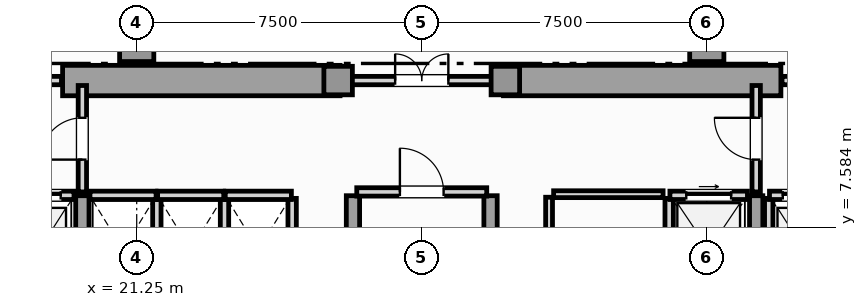
"""IFC4 building model, lengths in metres.
Left out: names, types, materials, properties, quantities, classifications, styles, units other than length and angle.
Written with IfcOpenShell. Run it as: python <this file> out.ifc"""

import sys

from ifc_helpers import new_model, si_unit, direction, frame, frame_2d, origin, origin_2d, place, context, subcontext, project, spatial, rectangle, extrude, element, fill, save


model = new_model("IFC4")
c1 = context("Model", 3, precision=1e-05, world=origin(), true_north=direction((0.0, 1.0)))
c2 = subcontext(c1, "Body", "Model", "MODEL_VIEW")
j1 = project(units=[si_unit("LENGTHUNIT", "METRE"), si_unit("PLANEANGLEUNIT", "RADIAN")], contexts=[c1])
p1 = place(None, origin())
s1 = spatial("IfcSite", under=j1, at=p1, CompositionType="ELEMENT")
p2 = place(p1, origin())
s2 = spatial("IfcBuilding", under=s1, at=p2, CompositionType="ELEMENT")
p3 = place(p2, frame((0.0, 0.0, 19.8)))
s3 = spatial("IfcBuildingStorey", under=s2, at=p3, CompositionType="ELEMENT", Elevation=19.8)
for number, where, z_axis, x_axis in (
    (1, (19.3, 11.45, 0.0), (0.0, 0.0, 1.0), (1.0, 0.0, 0.0)),
    (2, (30.9, 11.45, 0.0), (0.0, 0.0, 1.0), (1.0, 0.0, 0.0)),
):
    element("IfcWall", number, at=place(p3, frame(where, z_axis=z_axis, x_axis=x_axis)), inside=s3, PredefinedType="SHEAR", context=c2, shape_type="SweptSolid", body=[
        extrude(rectangle(XDim=7.3, YDim=0.8, at=frame_2d((3.65, 0.0))), origin(), (0.0, 0.0, 1.0), 4.4),
    ])
for number, where, z_axis, x_axis in (
    (3, (19.82, 0.92, 0.0), (0.0, 0.0, 1.0), (0.0, 1.0, 0.0)),
    (4, (26.94, 0.92, 0.0), (0.0, 0.0, 1.0), (0.0, 1.0, 0.0)),
    (5, (30.56, 0.92, 0.0), (0.0, 0.0, 1.0), (0.0, 1.0, 0.0)),
    (6, (37.55, 0.92, 0.0), (0.0, 0.0, 1.0), (0.0, 1.0, 0.0)),
):
    element("IfcWall", number, at=place(p3, frame(where, z_axis=z_axis, x_axis=x_axis)), inside=s3, PredefinedType="SHEAR", context=c2, shape_type="SweptSolid", body=[
        extrude(rectangle(XDim=7.5, YDim=0.35, at=frame_2d((3.75, 0.0))), origin(), (0.0, 0.0, 1.0), 4.4),
    ])
for number, where, z_axis, x_axis in (
    (7, (26.55, 11.45, 0.0), (0.0, 0.0, 1.0), (1.0, 0.0, 0.0)),
    (8, (30.95, 11.45, 0.0), (0.0, 0.0, 1.0), (1.0, 0.0, 0.0)),
):
    element("IfcColumn", number, at=place(p3, frame(where, z_axis=z_axis, x_axis=x_axis)), inside=s3, PredefinedType="COLUMN", context=c2, shape_type="SweptSolid", body=[
        extrude(rectangle(XDim=0.75, YDim=0.75, at=origin_2d()), origin(), (0.0, 0.0, 1.0), 4.8),
    ])
for number, where, z_axis, x_axis in (
    (9, (21.25, 12.4, 0.0), (0.0, 0.0, 1.0), (1.0, 0.0, 0.0)),
    (10, (36.25, 12.4, 0.0), (0.0, 0.0, 1.0), (1.0, 0.0, 0.0)),
):
    element("IfcColumn", number, at=place(p3, frame(where, z_axis=z_axis, x_axis=x_axis)), inside=s3, PredefinedType="COLUMN", context=c2, shape_type="SweptSolid", body=[
        extrude(rectangle(XDim=0.9, YDim=0.9, at=origin_2d()), origin(), (0.0, 0.0, 1.0), 4.8),
    ])
p4 = place(p3, frame((17.78, 8.43, 0.0), z_axis=(0.0, 0.0, 1.0), x_axis=(1.0, 0.0, 0.0)))
e11 = element("IfcWall", 11, at=p4, inside=s3, PredefinedType="SOLIDWALL", context=c2, shape_type="SweptSolid", body=[
    extrude(rectangle(XDim=1.82, YDim=0.22, at=frame_2d((0.91, 0.0))), origin(), (0.0, 0.0, 1.0), 4.4),
])
p5 = place(p4, frame((0.35, 0.0, 0.0)))
e12 = element("IfcOpeningElement", 12, at=p5, cuts=e11, PredefinedType="OPENING", context=c2, shape_type="SweptSolid", body=[
    extrude(rectangle(XDim=1.12, YDim=2.25, at=frame_2d((0.56, 1.125))), frame((0.0, 0.12, 0.0), z_axis=(0.0, -1.0, 0.0), x_axis=(1.0, 0.0, 0.0)), (0.0, 0.0, 1.0), 0.24),
])
p6 = place(p3, frame((37.88, 5.65, 0.0), z_axis=(0.0, 0.0, 1.0), x_axis=(0.0, 1.0, 0.0)))
e13 = element("IfcWall", 13, at=p6, inside=s3, PredefinedType="SOLIDWALL", context=c2, shape_type="SweptSolid", body=[
    extrude(rectangle(XDim=2.7, YDim=0.22, at=frame_2d((1.35, 0.0))), origin(), (0.0, 0.0, 1.0), 4.4),
])
p7 = place(p3, frame((37.9, 8.43, 0.0), z_axis=(0.0, 0.0, 1.0), x_axis=(1.0, 0.0, 0.0)))
e14 = element("IfcWall", 14, at=p7, inside=s3, PredefinedType="SOLIDWALL", context=c2, shape_type="SweptSolid", body=[
    extrude(rectangle(XDim=1.82, YDim=0.22, at=frame_2d((0.91, 0.0))), origin(), (0.0, 0.0, 1.0), 4.4),
])
p8 = place(p7, frame((0.35, 0.0, 0.0)))
e15 = element("IfcOpeningElement", 15, at=p8, cuts=e14, PredefinedType="OPENING", context=c2, shape_type="SweptSolid", body=[
    extrude(rectangle(XDim=1.12, YDim=2.25, at=frame_2d((0.56, 1.125))), frame((0.0, 0.12, 0.0), z_axis=(0.0, -1.0, 0.0), x_axis=(1.0, 0.0, 0.0)), (0.0, 0.0, 1.0), 0.24),
])
p9 = place(p3, frame((35.26, 5.65, 0.0), z_axis=(0.0, 0.0, 1.0), x_axis=(0.0, 1.0, 0.0)))
e16 = element("IfcWall", 16, at=p9, inside=s3, PredefinedType="SOLIDWALL", context=c2, shape_type="SweptSolid", body=[
    extrude(rectangle(XDim=2.7, YDim=0.22, at=frame_2d((1.35, 0.0))), origin(), (0.0, 0.0, 1.0), 4.4),
])
p10 = place(p3, frame((35.28, 8.43, 0.0), z_axis=(0.0, 0.0, 1.0), x_axis=(1.0, 0.0, 0.0)))
e17 = element("IfcWall", 17, at=p10, inside=s3, PredefinedType="SOLIDWALL", context=c2, shape_type="SweptSolid", body=[
    extrude(rectangle(XDim=2.04, YDim=0.22, at=frame_2d((1.02, 0.0))), origin(), (0.0, 0.0, 1.0), 4.4),
])
p11 = place(p10, frame((0.43, 0.0, 0.0)))
e18 = element("IfcOpeningElement", 18, at=p11, cuts=e17, PredefinedType="OPENING", context=c2, shape_type="SweptSolid", body=[
    extrude(rectangle(XDim=1.18, YDim=2.2, at=frame_2d((0.59, 1.1))), frame((0.0, 0.12, 0.0), z_axis=(0.0, -1.0, 0.0), x_axis=(1.0, 0.0, 0.0)), (0.0, 0.0, 1.0), 0.24),
])
p12 = place(p3, frame((21.78, 5.65, 0.0), z_axis=(0.0, 0.0, 1.0), x_axis=(0.0, 1.0, 0.0)))
e19 = element("IfcWall", 19, at=p12, inside=s3, PredefinedType="SOLIDWALL", context=c2, shape_type="SweptSolid", body=[
    extrude(rectangle(XDim=2.7, YDim=0.22, at=frame_2d((1.35, 0.0))), origin(), (0.0, 0.0, 1.0), 4.4),
])
p13 = place(p3, frame((20.02, 8.43, 0.0), z_axis=(0.0, 0.0, 1.0), x_axis=(1.0, 0.0, 0.0)))
e20 = element("IfcWall", 20, at=p13, inside=s3, PredefinedType="SOLIDWALL", context=c2, shape_type="SweptSolid", body=[
    extrude(rectangle(XDim=1.74, YDim=0.22, at=frame_2d((0.87, 0.0))), origin(), (0.0, 0.0, 1.0), 4.4),
])
p14 = place(p3, frame((23.56, 5.65, 0.0), z_axis=(0.0, 0.0, 1.0), x_axis=(0.0, 1.0, 0.0)))
e21 = element("IfcWall", 21, at=p14, inside=s3, PredefinedType="SOLIDWALL", context=c2, shape_type="SweptSolid", body=[
    extrude(rectangle(XDim=2.7, YDim=0.22, at=frame_2d((1.35, 0.0))), origin(), (0.0, 0.0, 1.0), 4.4),
])
p15 = place(p3, frame((21.8, 8.43, 0.0), z_axis=(0.0, 0.0, 1.0), x_axis=(1.0, 0.0, 0.0)))
e22 = element("IfcWall", 22, at=p15, inside=s3, PredefinedType="SOLIDWALL", context=c2, shape_type="SweptSolid", body=[
    extrude(rectangle(XDim=1.74, YDim=0.22, at=frame_2d((0.87, 0.0))), origin(), (0.0, 0.0, 1.0), 4.4),
])
p16 = place(p3, frame((25.34, 5.65, 0.0), z_axis=(0.0, 0.0, 1.0), x_axis=(0.0, 1.0, 0.0)))
e23 = element("IfcWall", 23, at=p16, inside=s3, PredefinedType="SOLIDWALL", context=c2, shape_type="SweptSolid", body=[
    extrude(rectangle(XDim=2.7, YDim=0.22, at=frame_2d((1.35, 0.0))), origin(), (0.0, 0.0, 1.0), 4.4),
])
p17 = place(p3, frame((23.58, 8.43, 0.0), z_axis=(0.0, 0.0, 1.0), x_axis=(1.0, 0.0, 0.0)))
e24 = element("IfcWall", 24, at=p17, inside=s3, PredefinedType="SOLIDWALL", context=c2, shape_type="SweptSolid", body=[
    extrude(rectangle(XDim=1.74, YDim=0.22, at=frame_2d((0.87, 0.0))), origin(), (0.0, 0.0, 1.0), 4.4),
])
p18 = place(p3, frame((27.04, 8.52, 0.0), z_axis=(0.0, 0.0, 1.0), x_axis=(1.0, 0.0, 0.0)))
e25 = element("IfcWall", 25, at=p18, inside=s3, PredefinedType="SOLIDWALL", context=c2, shape_type="SweptSolid", body=[
    extrude(rectangle(XDim=3.42, YDim=0.22, at=frame_2d((1.71, 0.0))), origin(), (0.0, 0.0, 1.0), 4.4),
])
p19 = place(p18, frame((1.135, 0.0, 0.0)))
e26 = element("IfcOpeningElement", 26, at=p19, cuts=e25, PredefinedType="OPENING", context=c2, shape_type="SweptSolid", body=[
    extrude(rectangle(XDim=1.15, YDim=2.2, at=frame_2d((0.575, 1.1))), frame((0.0, 0.12, 0.0), z_axis=(0.0, -1.0, 0.0), x_axis=(1.0, 0.0, 0.0)), (0.0, 0.0, 1.0), 0.24),
])
p20 = place(p3, frame((19.82, 8.52, 0.0), z_axis=(0.0, 0.0, 1.0), x_axis=(0.0, 1.0, 0.0)))
e27 = element("IfcWall", 27, at=p20, inside=s3, PredefinedType="SOLIDWALL", context=c2, shape_type="SweptSolid", body=[
    extrude(rectangle(XDim=2.8, YDim=0.22, at=frame_2d((1.4, 0.0))), origin(), (0.0, 0.0, 1.0), 3.855),
])
p21 = place(p20, frame((0.85, 0.0, 0.0)))
e28 = element("IfcOpeningElement", 28, at=p21, cuts=e27, PredefinedType="OPENING", context=c2, shape_type="SweptSolid", body=[
    extrude(rectangle(XDim=1.1, YDim=2.2, at=frame_2d((0.55, 1.1))), frame((0.0, 0.12, 0.0), z_axis=(0.0, -1.0, 0.0), x_axis=(1.0, 0.0, 0.0)), (0.0, 0.0, 1.0), 0.24),
])
p22 = place(p3, frame((37.55, 8.52, 0.0), z_axis=(0.0, 0.0, 1.0), x_axis=(0.0, 1.0, 0.0)))
e29 = element("IfcWall", 29, at=p22, inside=s3, PredefinedType="SOLIDWALL", context=c2, shape_type="SweptSolid", body=[
    extrude(rectangle(XDim=2.8, YDim=0.22, at=frame_2d((1.4, 0.0))), origin(), (0.0, 0.0, 1.0), 3.855),
])
p23 = place(p22, frame((0.85, 0.0, 0.0)))
e30 = element("IfcOpeningElement", 30, at=p23, cuts=e29, PredefinedType="OPENING", context=c2, shape_type="SweptSolid", body=[
    extrude(rectangle(XDim=1.1, YDim=2.2, at=frame_2d((0.55, 1.1))), frame((0.0, 0.12, 0.0), z_axis=(0.0, -1.0, 0.0), x_axis=(1.0, 0.0, 0.0)), (0.0, 0.0, 1.0), 0.24),
])
p24 = place(p3, frame((16.23, 11.45, 0.0), z_axis=(0.0, 0.0, 1.0), x_axis=(1.0, 0.0, 0.0)))
e31 = element("IfcWall", 31, at=p24, inside=s3, PredefinedType="SOLIDWALL", context=c2, shape_type="SweptSolid", body=[
    extrude(rectangle(XDim=3.04, YDim=0.22, at=frame_2d((1.52, 0.0))), origin(), (0.0, 0.0, 1.0), 4.4),
])
p25 = place(p24, frame((0.97, 0.0, 0.0)))
e32 = element("IfcOpeningElement", 32, at=p25, cuts=e31, PredefinedType="OPENING", context=c2, shape_type="SweptSolid", body=[
    extrude(rectangle(XDim=1.1, YDim=2.2, at=frame_2d((0.55, 1.1))), frame((0.0, 0.12, 0.0), z_axis=(0.0, -1.0, 0.0), x_axis=(1.0, 0.0, 0.0)), (0.0, 0.0, 1.0), 0.24),
])
p26 = place(p3, frame((26.63, 11.45, 0.0), z_axis=(0.0, 0.0, 1.0), x_axis=(1.0, 0.0, 0.0)))
e33 = element("IfcWall", 33, at=p26, inside=s3, PredefinedType="SOLIDWALL", context=c2, shape_type="SweptSolid", body=[
    extrude(rectangle(XDim=4.24, YDim=0.22, at=frame_2d((2.12, 0.0))), origin(), (0.0, 0.0, 1.0), 4.4),
])
p27 = place(p26, frame((1.42, 0.0, 0.0)))
e34 = element("IfcOpeningElement", 34, at=p27, cuts=e33, PredefinedType="OPENING", context=c2, shape_type="SweptSolid", body=[
    extrude(rectangle(XDim=1.4, YDim=2.2, at=frame_2d((0.7, 1.1))), frame((0.0, 0.12, 0.0), z_axis=(0.0, -1.0, 0.0), x_axis=(1.0, 0.0, 0.0)), (0.0, 0.0, 1.0), 0.24),
])
p28 = place(p3, frame((38.23, 11.45, 0.0), z_axis=(0.0, 0.0, 1.0), x_axis=(1.0, 0.0, 0.0)))
e35 = element("IfcWall", 35, at=p28, inside=s3, PredefinedType="SOLIDWALL", context=c2, shape_type="SweptSolid", body=[
    extrude(rectangle(XDim=3.04, YDim=0.22, at=frame_2d((1.52, 0.0))), origin(), (0.0, 0.0, 1.0), 4.4),
])
p29 = place(p28, frame((0.97, 0.0, 0.0)))
e36 = element("IfcOpeningElement", 36, at=p29, cuts=e35, PredefinedType="OPENING", context=c2, shape_type="SweptSolid", body=[
    extrude(rectangle(XDim=1.1, YDim=2.2, at=frame_2d((0.55, 1.1))), frame((0.0, 0.12, 0.0), z_axis=(0.0, -1.0, 0.0), x_axis=(1.0, 0.0, 0.0)), (0.0, 0.0, 1.0), 0.24),
])
p30 = place(p3, frame((32.1, 5.65, 0.0), z_axis=(0.0, 0.0, 1.0), x_axis=(0.0, 1.0, 0.0)))
e37 = element("IfcWall", 37, at=p30, inside=s3, PredefinedType="PARTITIONING", context=c2, shape_type="SweptSolid", body=[
    extrude(rectangle(XDim=2.73, YDim=0.18, at=frame_2d((1.365, 0.0))), origin(), (0.0, 0.0, 1.0), 4.4),
])
p31 = place(p30, frame((0.925, 0.0, 0.0)))
e38 = element("IfcOpeningElement", 38, at=p31, cuts=e37, PredefinedType="OPENING", context=c2, shape_type="SweptSolid", body=[
    extrude(rectangle(XDim=0.88, YDim=2.05, at=frame_2d((0.44, 1.025))), frame((0.0, 0.1, 0.0), z_axis=(0.0, -1.0, 0.0), x_axis=(1.0, 0.0, 0.0)), (0.0, 0.0, 1.0), 0.2),
])
p32 = place(p3, frame((32.22, 8.46, 0.0), z_axis=(0.0, 0.0, 1.0), x_axis=(1.0, 0.0, 0.0)))
e39 = element("IfcWall", 39, at=p32, inside=s3, PredefinedType="PARTITIONING", context=c2, shape_type="SweptSolid", body=[
    extrude(rectangle(XDim=2.88, YDim=0.18, at=frame_2d((1.44, 0.0))), origin(), (0.0, 0.0, 1.0), 4.4),
])
p33 = place(p5, origin())
e40 = element("IfcDoor", 40, at=p33, inside=s3, OperationType="SLIDING_TO_RIGHT", PredefinedType="DOOR", context=c2, shape_type="SweptSolid", body=[
    extrude(rectangle(XDim=1.12, YDim=2.25, at=frame_2d((0.56, 1.125))), frame((0.0, 0.025, 0.0), z_axis=(0.0, -1.0, 0.0), x_axis=(1.0, 0.0, 0.0)), (0.0, 0.0, 1.0), 0.05),
])
fill(e12, e40)
p34 = place(p8, origin())
e41 = element("IfcDoor", 41, at=p34, inside=s3, OperationType="SLIDING_TO_LEFT", PredefinedType="DOOR", context=c2, shape_type="SweptSolid", body=[
    extrude(rectangle(XDim=1.12, YDim=2.25, at=frame_2d((0.56, 1.125))), frame((0.0, 0.025, 0.0), z_axis=(0.0, -1.0, 0.0), x_axis=(1.0, 0.0, 0.0)), (0.0, 0.0, 1.0), 0.05),
])
fill(e15, e41)
p35 = place(p11, origin())
e42 = element("IfcDoor", 42, at=p35, inside=s3, OperationType="SLIDING_TO_RIGHT", PredefinedType="DOOR", context=c2, shape_type="SweptSolid", body=[
    extrude(rectangle(XDim=1.18, YDim=2.2, at=frame_2d((0.59, 1.1))), frame((0.0, 0.025, 0.0), z_axis=(0.0, -1.0, 0.0), x_axis=(1.0, 0.0, 0.0)), (0.0, 0.0, 1.0), 0.05),
])
fill(e18, e42)
p36 = place(p19, origin())
e43 = element("IfcDoor", 43, at=p36, inside=s3, OperationType="SINGLE_SWING_LEFT", PredefinedType="DOOR", context=c2, shape_type="SweptSolid", body=[
    extrude(rectangle(XDim=1.15, YDim=2.2, at=frame_2d((0.575, 1.1))), frame((0.0, 0.025, 0.0), z_axis=(0.0, -1.0, 0.0), x_axis=(1.0, 0.0, 0.0)), (0.0, 0.0, 1.0), 0.05),
])
fill(e26, e43)
p37 = place(p21, origin())
e44 = element("IfcDoor", 44, at=p37, inside=s3, OperationType="SINGLE_SWING_LEFT", PredefinedType="DOOR", context=c2, shape_type="SweptSolid", body=[
    extrude(rectangle(XDim=1.1, YDim=2.2, at=frame_2d((0.55, 1.1))), frame((0.0, 0.025, 0.0), z_axis=(0.0, -1.0, 0.0), x_axis=(1.0, 0.0, 0.0)), (0.0, 0.0, 1.0), 0.05),
])
fill(e28, e44)
p38 = place(p23, origin())
e45 = element("IfcDoor", 45, at=p38, inside=s3, OperationType="SINGLE_SWING_RIGHT", PredefinedType="DOOR", context=c2, shape_type="SweptSolid", body=[
    extrude(rectangle(XDim=1.1, YDim=2.2, at=frame_2d((0.55, 1.1))), frame((0.0, 0.025, 0.0), z_axis=(0.0, -1.0, 0.0), x_axis=(1.0, 0.0, 0.0)), (0.0, 0.0, 1.0), 0.05),
])
fill(e30, e45)
p39 = place(p27, origin())
e46 = element("IfcDoor", 46, at=p39, inside=s3, OperationType="DOUBLE_DOOR_SINGLE_SWING", PredefinedType="DOOR", context=c2, shape_type="SweptSolid", body=[
    extrude(rectangle(XDim=1.4, YDim=2.2, at=frame_2d((0.7, 1.1))), frame((0.0, 0.025, 0.0), z_axis=(0.0, -1.0, 0.0), x_axis=(1.0, 0.0, 0.0)), (0.0, 0.0, 1.0), 0.05),
])
fill(e34, e46)
save(model, sys.argv[1])
